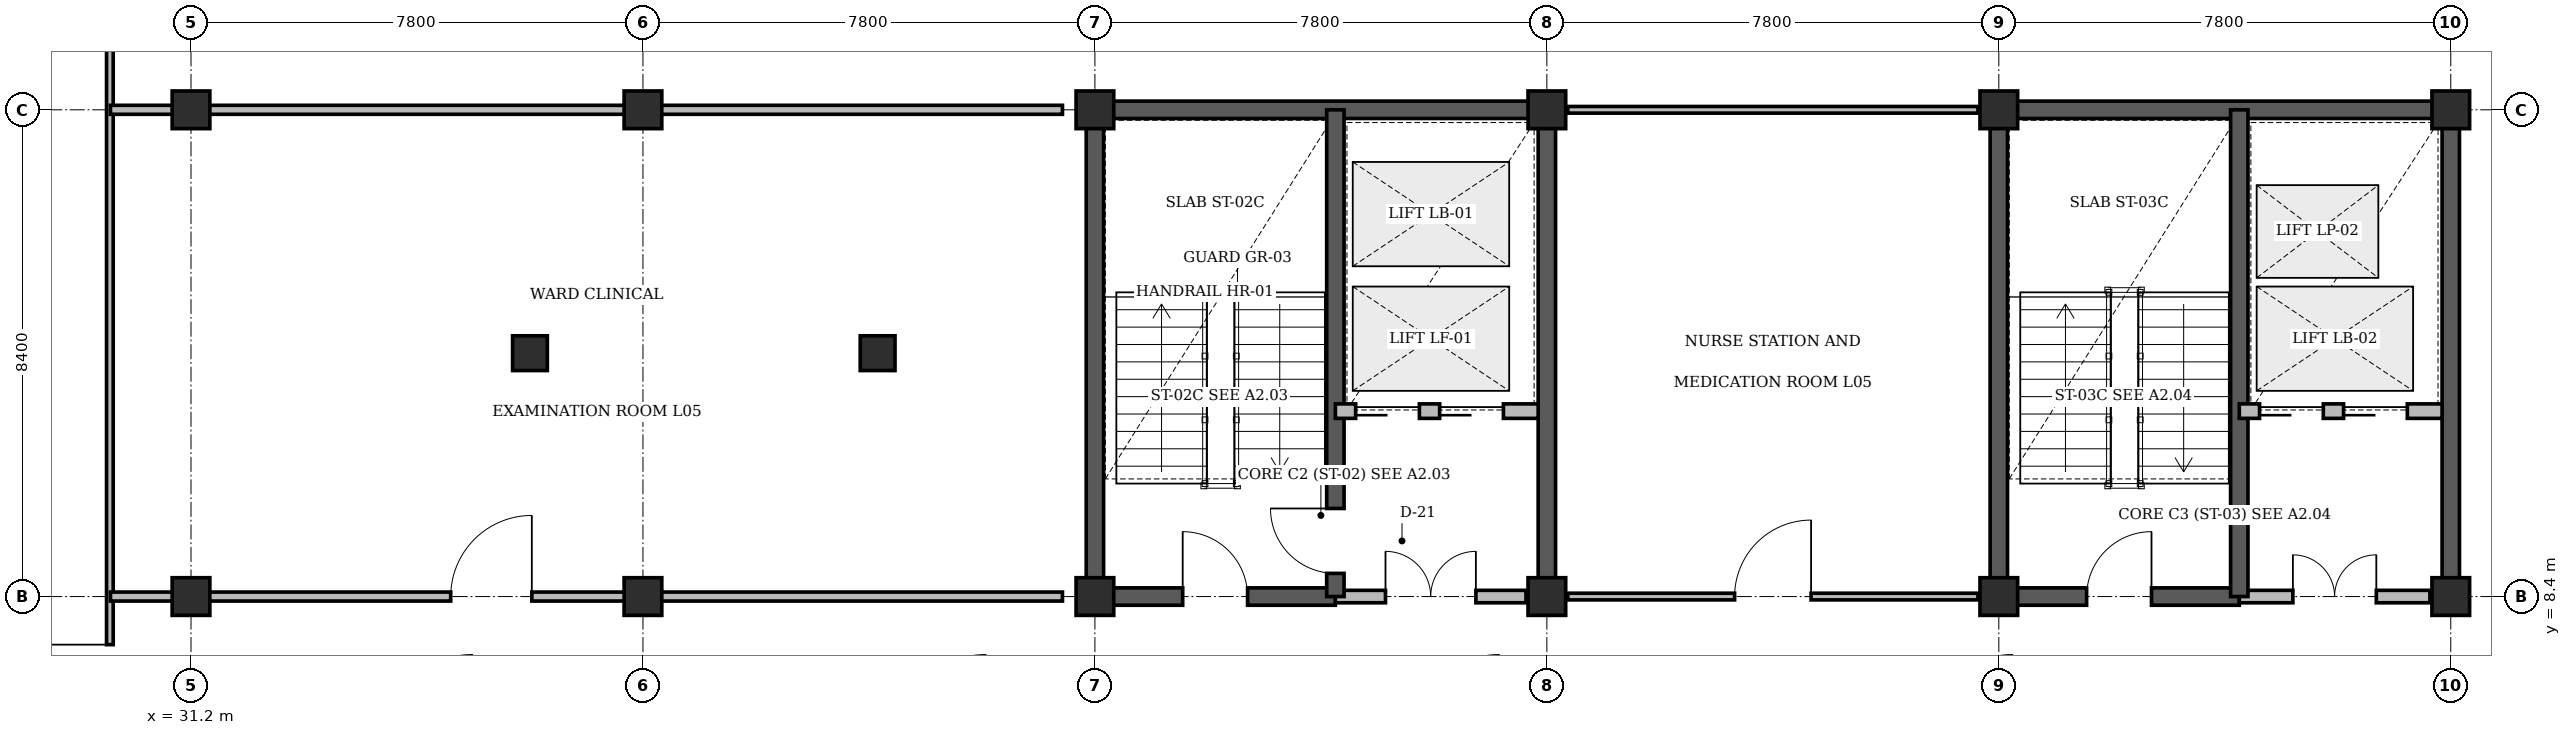
"""IFC4 building model, lengths in metres.
Left out: names, types, materials, properties, quantities, classifications, styles, units other than length and angle.
Written with IfcOpenShell. Run it as: python <this file> out.ifc"""

import sys

from ifc_helpers import new_model, si_unit, direction, frame, frame_2d, origin, origin_2d, place, context, subcontext, project, spatial, rectangle, circle, extrude, element, fill, save


model = new_model("IFC4")
c1 = context("Model", 3, precision=1e-05, world=origin(), true_north=direction((0.0, 1.0)))
c2 = subcontext(c1, "Body", "Model", "MODEL_VIEW")
j1 = project(units=[si_unit("LENGTHUNIT", "METRE"), si_unit("PLANEANGLEUNIT", "RADIAN")], contexts=[c1])
p1 = place(None, origin())
s1 = spatial("IfcSite", under=j1, at=p1, CompositionType="ELEMENT")
p2 = place(p1, origin())
s2 = spatial("IfcBuilding", under=s1, at=p2, CompositionType="ELEMENT")
p3 = place(p2, frame((0.0, 0.0, 22.2)))
s3 = spatial("IfcBuildingStorey", under=s2, at=p3, CompositionType="ELEMENT", Elevation=22.2)
p4 = place(p3, frame((46.65, 16.8, 0.0), z_axis=(0.0, 0.0, 1.0), x_axis=(1.0, 0.0, 0.0)))
e1 = element("IfcWall", 1, at=p4, inside=s3, PredefinedType="SHEAR", context=c2, shape_type="SweptSolid", body=[
    extrude(rectangle(XDim=8.1, YDim=0.3, at=frame_2d((4.05, 0.0))), origin(), (0.0, 0.0, 1.0), 3.92),
])
for number, where, z_axis, x_axis in (
    (2, (46.8, 8.4, 0.0), (0.0, 0.0, 1.0), (0.0, 1.0, 0.0)),
    (3, (54.6, 8.4, 0.0), (0.0, 0.0, 1.0), (0.0, 1.0, 0.0)),
):
    element("IfcWall", number, at=place(p3, frame(where, z_axis=z_axis, x_axis=x_axis)), inside=s3, PredefinedType="SHEAR", context=c2, shape_type="SweptSolid", body=[
        extrude(rectangle(XDim=8.4, YDim=0.3, at=frame_2d((4.2, 0.0))), origin(), (0.0, 0.0, 1.0), 3.92),
    ])
p5 = place(p3, frame((62.25, 16.8, 0.0), z_axis=(0.0, 0.0, 1.0), x_axis=(1.0, 0.0, 0.0)))
e4 = element("IfcWall", 4, at=p5, inside=s3, PredefinedType="SHEAR", context=c2, shape_type="SweptSolid", body=[
    extrude(rectangle(XDim=8.1, YDim=0.3, at=frame_2d((4.05, 0.0))), origin(), (0.0, 0.0, 1.0), 3.92),
])
for number, where, z_axis, x_axis in (
    (5, (62.4, 8.4, 0.0), (0.0, 0.0, 1.0), (0.0, 1.0, 0.0)),
    (6, (70.2, 8.4, 0.0), (0.0, 0.0, 1.0), (0.0, 1.0, 0.0)),
):
    element("IfcWall", number, at=place(p3, frame(where, z_axis=z_axis, x_axis=x_axis)), inside=s3, PredefinedType="SHEAR", context=c2, shape_type="SweptSolid", body=[
        extrude(rectangle(XDim=8.4, YDim=0.3, at=frame_2d((4.2, 0.0))), origin(), (0.0, 0.0, 1.0), 3.92),
    ])
for number, where, z_axis, x_axis in (
    (7, (31.2, 8.4, 0.0), (0.0, 0.0, 1.0), (1.0, 0.0, 0.0)),
    (8, (31.2, 16.8, 0.0), (0.0, 0.0, 1.0), (1.0, 0.0, 0.0)),
    (9, (39.0, 8.4, 0.0), (0.0, 0.0, 1.0), (1.0, 0.0, 0.0)),
    (10, (39.0, 16.8, 0.0), (0.0, 0.0, 1.0), (1.0, 0.0, 0.0)),
    (11, (46.8, 8.4, 0.0), (0.0, 0.0, 1.0), (1.0, 0.0, 0.0)),
    (12, (46.8, 16.8, 0.0), (0.0, 0.0, 1.0), (1.0, 0.0, 0.0)),
    (13, (54.6, 8.4, 0.0), (0.0, 0.0, 1.0), (1.0, 0.0, 0.0)),
    (14, (54.6, 16.8, 0.0), (0.0, 0.0, 1.0), (1.0, 0.0, 0.0)),
    (15, (62.4, 8.4, 0.0), (0.0, 0.0, 1.0), (1.0, 0.0, 0.0)),
    (16, (62.4, 16.8, 0.0), (0.0, 0.0, 1.0), (1.0, 0.0, 0.0)),
    (17, (70.2, 8.4, 0.0), (0.0, 0.0, 1.0), (1.0, 0.0, 0.0)),
    (18, (70.2, 16.8, 0.0), (0.0, 0.0, 1.0), (1.0, 0.0, 0.0)),
):
    element("IfcColumn", number, at=place(p3, frame(where, z_axis=z_axis, x_axis=x_axis)), inside=s3, PredefinedType="COLUMN", context=c2, shape_type="SweptSolid", body=[
        extrude(rectangle(XDim=0.65, YDim=0.65, at=origin_2d()), origin(), (0.0, 0.0, 1.0), 4.2),
    ])
for number, where, z_axis, x_axis in (
    (19, (37.05, 12.6, 0.0), (0.0, 0.0, 1.0), (1.0, 0.0, 0.0)),
    (20, (43.05, 12.6, 0.0), (0.0, 0.0, 1.0), (1.0, 0.0, 0.0)),
):
    element("IfcColumn", number, at=place(p3, frame(where, z_axis=z_axis, x_axis=x_axis)), inside=s3, PredefinedType="PILASTER", context=c2, shape_type="SweptSolid", body=[
        extrude(circle(Radius=0.3, at=origin_2d()), origin(), (0.0, 0.0, 1.0), 4.2),
    ])
p6 = place(p3, frame((46.8, 8.4, 0.0), z_axis=(0.0, 0.0, 1.0), x_axis=(1.0, 0.0, 0.0)))
e21 = element("IfcWall", 21, at=p6, inside=s3, PredefinedType="SHEAR", context=c2, shape_type="SweptSolid", body=[
    extrude(rectangle(XDim=4.15, YDim=0.3, at=frame_2d((2.075, 0.0))), origin(), (0.0, 0.0, 1.0), 4.2),
])
p7 = place(p6, frame((1.515, 0.0, 0.0)))
e22 = element("IfcOpeningElement", 22, at=p7, cuts=e21, PredefinedType="OPENING", context=c2, shape_type="SweptSolid", body=[
    extrude(rectangle(XDim=1.12, YDim=2.15, at=frame_2d((0.56, 1.075))), frame((0.0, 0.16, 0.0), z_axis=(0.0, -1.0, 0.0), x_axis=(1.0, 0.0, 0.0)), (0.0, 0.0, 1.0), 0.32),
])
p8 = place(p3, frame((50.95, 8.4, 0.0), z_axis=(0.0, 0.0, 1.0), x_axis=(1.0, 0.0, 0.0)))
e23 = element("IfcWall", 23, at=p8, inside=s3, PredefinedType="STANDARD", context=c2, shape_type="SweptSolid", body=[
    extrude(rectangle(XDim=3.29, YDim=0.215, at=frame_2d((1.645, 0.0))), origin(), (0.0, 0.0, 1.0), 3.27),
])
p9 = place(p8, frame((0.865, 0.0, 0.0)))
e24 = element("IfcOpeningElement", 24, at=p9, cuts=e23, PredefinedType="OPENING", context=c2, shape_type="SweptSolid", body=[
    extrude(rectangle(XDim=1.56, YDim=2.2, at=frame_2d((0.78, 1.1))), frame((0.0, 0.118, 0.0), z_axis=(0.0, -1.0, 0.0), x_axis=(1.0, 0.0, 0.0)), (0.0, 0.0, 1.0), 0.235),
])
p10 = place(p3, frame((50.95, 8.4, 0.0), z_axis=(0.0, 0.0, 1.0), x_axis=(0.0, 1.0, 0.0)))
e25 = element("IfcWall", 25, at=p10, inside=s3, PredefinedType="SHEAR", context=c2, shape_type="SweptSolid", body=[
    extrude(rectangle(XDim=8.4, YDim=0.3, at=frame_2d((4.2, 0.0))), origin(), (0.0, 0.0, 1.0), 4.2),
])
p11 = place(p10, frame((0.4, 0.0, 0.0)))
e26 = element("IfcOpeningElement", 26, at=p11, cuts=e25, PredefinedType="OPENING", context=c2, shape_type="SweptSolid", body=[
    extrude(rectangle(XDim=1.12, YDim=2.15, at=frame_2d((0.56, 1.075))), frame((0.0, 0.16, 0.0), z_axis=(0.0, -1.0, 0.0), x_axis=(1.0, 0.0, 0.0)), (0.0, 0.0, 1.0), 0.32),
])
p12 = place(p3, frame((50.95, 11.6, 0.0), z_axis=(0.0, 0.0, 1.0), x_axis=(1.0, 0.0, 0.0)))
e27 = element("IfcWall", 27, at=p12, inside=s3, PredefinedType="STANDARD", context=c2, shape_type="SweptSolid", body=[
    extrude(rectangle(XDim=3.5, YDim=0.25, at=frame_2d((1.75, 0.0))), origin(), (0.0, 0.0, 1.0), 3.9),
])
p13 = place(p12, frame((0.35, 0.0, 0.0)))
e28 = element("IfcOpeningElement", 28, at=p13, cuts=e27, PredefinedType="OPENING", context=c2, shape_type="SweptSolid", body=[
    extrude(rectangle(XDim=1.1, YDim=2.2, at=frame_2d((0.55, 1.1))), frame((0.0, 0.135, 0.0), z_axis=(0.0, -1.0, 0.0), x_axis=(1.0, 0.0, 0.0)), (0.0, 0.0, 1.0), 0.27),
])
p14 = place(p12, frame((1.8, 0.0, 0.0)))
e29 = element("IfcOpeningElement", 29, at=p14, cuts=e27, PredefinedType="OPENING", context=c2, shape_type="SweptSolid", body=[
    extrude(rectangle(XDim=1.1, YDim=2.2, at=frame_2d((0.55, 1.1))), frame((0.0, 0.135, 0.0), z_axis=(0.0, -1.0, 0.0), x_axis=(1.0, 0.0, 0.0)), (0.0, 0.0, 1.0), 0.27),
])
p15 = place(p3, frame((62.4, 8.4, 0.0), z_axis=(0.0, 0.0, 1.0), x_axis=(1.0, 0.0, 0.0)))
e30 = element("IfcWall", 30, at=p15, inside=s3, PredefinedType="SHEAR", context=c2, shape_type="SweptSolid", body=[
    extrude(rectangle(XDim=4.15, YDim=0.3, at=frame_2d((2.075, 0.0))), origin(), (0.0, 0.0, 1.0), 4.2),
])
p16 = place(p15, frame((1.515, 0.0, 0.0)))
e31 = element("IfcOpeningElement", 31, at=p16, cuts=e30, PredefinedType="OPENING", context=c2, shape_type="SweptSolid", body=[
    extrude(rectangle(XDim=1.12, YDim=2.15, at=frame_2d((0.56, 1.075))), frame((0.0, 0.16, 0.0), z_axis=(0.0, -1.0, 0.0), x_axis=(1.0, 0.0, 0.0)), (0.0, 0.0, 1.0), 0.32),
])
p17 = place(p3, frame((66.55, 8.4, 0.0), z_axis=(0.0, 0.0, 1.0), x_axis=(1.0, 0.0, 0.0)))
e32 = element("IfcWall", 32, at=p17, inside=s3, PredefinedType="STANDARD", context=c2, shape_type="SweptSolid", body=[
    extrude(rectangle(XDim=3.29, YDim=0.215, at=frame_2d((1.645, 0.0))), origin(), (0.0, 0.0, 1.0), 3.27),
])
p18 = place(p17, frame((0.925, 0.0, 0.0)))
e33 = element("IfcOpeningElement", 33, at=p18, cuts=e32, PredefinedType="OPENING", context=c2, shape_type="SweptSolid", body=[
    extrude(rectangle(XDim=1.44, YDim=2.2, at=frame_2d((0.72, 1.1))), frame((0.0, 0.118, 0.0), z_axis=(0.0, -1.0, 0.0), x_axis=(1.0, 0.0, 0.0)), (0.0, 0.0, 1.0), 0.235),
])
p19 = place(p3, frame((66.55, 8.4, 0.0), z_axis=(0.0, 0.0, 1.0), x_axis=(0.0, 1.0, 0.0)))
e34 = element("IfcWall", 34, at=p19, inside=s3, PredefinedType="SHEAR", context=c2, shape_type="SweptSolid", body=[
    extrude(rectangle(XDim=8.4, YDim=0.3, at=frame_2d((4.2, 0.0))), origin(), (0.0, 0.0, 1.0), 4.2),
])
p20 = place(p3, frame((66.55, 11.6, 0.0), z_axis=(0.0, 0.0, 1.0), x_axis=(1.0, 0.0, 0.0)))
e35 = element("IfcWall", 35, at=p20, inside=s3, PredefinedType="STANDARD", context=c2, shape_type="SweptSolid", body=[
    extrude(rectangle(XDim=3.5, YDim=0.25, at=frame_2d((1.75, 0.0))), origin(), (0.0, 0.0, 1.0), 3.9),
])
p21 = place(p20, frame((0.35, 0.0, 0.0)))
e36 = element("IfcOpeningElement", 36, at=p21, cuts=e35, PredefinedType="OPENING", context=c2, shape_type="SweptSolid", body=[
    extrude(rectangle(XDim=1.1, YDim=2.2, at=frame_2d((0.55, 1.1))), frame((0.0, 0.135, 0.0), z_axis=(0.0, -1.0, 0.0), x_axis=(1.0, 0.0, 0.0)), (0.0, 0.0, 1.0), 0.27),
])
p22 = place(p20, frame((1.8, 0.0, 0.0)))
e37 = element("IfcOpeningElement", 37, at=p22, cuts=e35, PredefinedType="OPENING", context=c2, shape_type="SweptSolid", body=[
    extrude(rectangle(XDim=1.1, YDim=2.2, at=frame_2d((0.55, 1.1))), frame((0.0, 0.135, 0.0), z_axis=(0.0, -1.0, 0.0), x_axis=(1.0, 0.0, 0.0)), (0.0, 0.0, 1.0), 0.27),
])
p23 = place(p3, frame((29.8, 6.0, 0.0), z_axis=(0.0, 0.0, 1.0), x_axis=(0.0, 1.0, 0.0)))
e38 = element("IfcWall", 38, at=p23, inside=s3, PredefinedType="PARTITIONING", context=c2, shape_type="SweptSolid", body=[
    extrude(rectangle(XDim=13.2, YDim=0.115, at=frame_2d((6.6, 0.0))), origin(), (0.0, 0.0, 1.0), 3.9),
])
p24 = place(p23, frame((0.25, 0.0, 0.0)))
e39 = element("IfcOpeningElement", 39, at=p24, cuts=e38, PredefinedType="OPENING", context=c2, shape_type="SweptSolid", body=[
    extrude(rectangle(XDim=1.32, YDim=2.15, at=frame_2d((0.66, 1.075))), frame((0.0, 0.067, 0.0), z_axis=(0.0, -1.0, 0.0), x_axis=(1.0, 0.0, 0.0)), (0.0, 0.0, 1.0), 0.135),
])
p25 = place(p3, frame((54.96, 8.4, 0.0), z_axis=(0.0, 0.0, 1.0), x_axis=(1.0, 0.0, 0.0)))
e40 = element("IfcWall", 40, at=p25, inside=s3, PredefinedType="PARTITIONING", context=c2, shape_type="SweptSolid", body=[
    extrude(rectangle(XDim=7.08, YDim=0.115, at=frame_2d((3.54, 0.0))), origin(), (0.0, 0.0, 1.0), 3.27),
])
p26 = place(p25, frame((2.88, 0.0, 0.0)))
e41 = element("IfcOpeningElement", 41, at=p26, cuts=e40, PredefinedType="OPENING", context=c2, shape_type="SweptSolid", body=[
    extrude(rectangle(XDim=1.32, YDim=2.15, at=frame_2d((0.66, 1.075))), frame((0.0, 0.067, 0.0), z_axis=(0.0, -1.0, 0.0), x_axis=(1.0, 0.0, 0.0)), (0.0, 0.0, 1.0), 0.135),
])
p27 = place(p3, frame((54.96, 16.8, 0.0), z_axis=(0.0, 0.0, 1.0), x_axis=(1.0, 0.0, 0.0)))
e42 = element("IfcWall", 42, at=p27, inside=s3, PredefinedType="PARTITIONING", context=c2, shape_type="SweptSolid", body=[
    extrude(rectangle(XDim=7.08, YDim=0.115, at=frame_2d((3.54, 0.0))), origin(), (0.0, 0.0, 1.0), 3.27),
])
p28 = place(p3, frame((29.81, 8.4, 0.0), z_axis=(0.0, 0.0, 1.0), x_axis=(1.0, 0.0, 0.0)))
e43 = element("IfcWall", 43, at=p28, inside=s3, PredefinedType="PARTITIONING", context=c2, shape_type="SweptSolid", body=[
    extrude(rectangle(XDim=16.43, YDim=0.155, at=frame_2d((8.215, 0.0))), origin(), (0.0, 0.0, 1.0), 3.27),
])
p29 = place(p28, frame((5.872, 0.0, 0.0)))
e44 = element("IfcOpeningElement", 44, at=p29, cuts=e43, PredefinedType="OPENING", context=c2, shape_type="SweptSolid", body=[
    extrude(rectangle(XDim=1.4, YDim=2.2, at=frame_2d((0.7, 1.1))), frame((0.0, 0.087, 0.0), z_axis=(0.0, -1.0, 0.0), x_axis=(1.0, 0.0, 0.0)), (0.0, 0.0, 1.0), 0.175),
])
p30 = place(p3, frame((29.81, 16.8, 0.0), z_axis=(0.0, 0.0, 1.0), x_axis=(1.0, 0.0, 0.0)))
e45 = element("IfcWall", 45, at=p30, inside=s3, PredefinedType="PARTITIONING", context=c2, shape_type="SweptSolid", body=[
    extrude(rectangle(XDim=16.43, YDim=0.155, at=frame_2d((8.215, 0.0))), origin(), (0.0, 0.0, 1.0), 3.27),
])
p31 = place(p7, origin())
e46 = element("IfcDoor", 46, at=p31, inside=s3, OperationType="SINGLE_SWING_LEFT", PredefinedType="DOOR", context=c2, shape_type="SweptSolid", body=[
    extrude(rectangle(XDim=1.12, YDim=2.15, at=frame_2d((0.56, 1.075))), frame((0.0, 0.025, 0.0), z_axis=(0.0, -1.0, 0.0), x_axis=(1.0, 0.0, 0.0)), (0.0, 0.0, 1.0), 0.05),
])
fill(e22, e46)
p32 = place(p9, origin())
e47 = element("IfcDoor", 47, at=p32, inside=s3, OperationType="DOUBLE_DOOR_SINGLE_SWING", PredefinedType="DOOR", context=c2, shape_type="SweptSolid", body=[
    extrude(rectangle(XDim=1.56, YDim=2.2, at=frame_2d((0.78, 1.1))), frame((0.0, 0.025, 0.0), z_axis=(0.0, -1.0, 0.0), x_axis=(1.0, 0.0, 0.0)), (0.0, 0.0, 1.0), 0.05),
])
fill(e24, e47)
p33 = place(p11, origin())
e48 = element("IfcDoor", 48, at=p33, inside=s3, OperationType="SINGLE_SWING_RIGHT", PredefinedType="DOOR", context=c2, shape_type="SweptSolid", body=[
    extrude(rectangle(XDim=1.12, YDim=2.15, at=frame_2d((0.56, 1.075))), frame((0.0, 0.025, 0.0), z_axis=(0.0, -1.0, 0.0), x_axis=(1.0, 0.0, 0.0)), (0.0, 0.0, 1.0), 0.05),
])
fill(e26, e48)
p34 = place(p13, origin())
e49 = element("IfcDoor", 49, at=p34, inside=s3, OperationType="SLIDING_TO_LEFT", PredefinedType="DOOR", context=c2, shape_type="SweptSolid", body=[
    extrude(rectangle(XDim=1.1, YDim=2.2, at=frame_2d((0.55, 1.1))), frame((0.0, 0.025, 0.0), z_axis=(0.0, -1.0, 0.0), x_axis=(1.0, 0.0, 0.0)), (0.0, 0.0, 1.0), 0.05),
])
fill(e28, e49)
p35 = place(p14, origin())
e50 = element("IfcDoor", 50, at=p35, inside=s3, OperationType="SLIDING_TO_LEFT", PredefinedType="DOOR", context=c2, shape_type="SweptSolid", body=[
    extrude(rectangle(XDim=1.1, YDim=2.2, at=frame_2d((0.55, 1.1))), frame((0.0, 0.025, 0.0), z_axis=(0.0, -1.0, 0.0), x_axis=(1.0, 0.0, 0.0)), (0.0, 0.0, 1.0), 0.05),
])
fill(e29, e50)
p36 = place(p16, origin())
e51 = element("IfcDoor", 51, at=p36, inside=s3, OperationType="SINGLE_SWING_RIGHT", PredefinedType="DOOR", context=c2, shape_type="SweptSolid", body=[
    extrude(rectangle(XDim=1.12, YDim=2.15, at=frame_2d((0.56, 1.075))), frame((0.0, 0.025, 0.0), z_axis=(0.0, -1.0, 0.0), x_axis=(1.0, 0.0, 0.0)), (0.0, 0.0, 1.0), 0.05),
])
fill(e31, e51)
p37 = place(p18, origin())
e52 = element("IfcDoor", 52, at=p37, inside=s3, OperationType="DOUBLE_DOOR_SINGLE_SWING", PredefinedType="DOOR", context=c2, shape_type="SweptSolid", body=[
    extrude(rectangle(XDim=1.44, YDim=2.2, at=frame_2d((0.72, 1.1))), frame((0.0, 0.025, 0.0), z_axis=(0.0, -1.0, 0.0), x_axis=(1.0, 0.0, 0.0)), (0.0, 0.0, 1.0), 0.05),
])
fill(e33, e52)
p38 = place(p21, origin())
e53 = element("IfcDoor", 53, at=p38, inside=s3, OperationType="SLIDING_TO_LEFT", PredefinedType="DOOR", context=c2, shape_type="SweptSolid", body=[
    extrude(rectangle(XDim=1.1, YDim=2.2, at=frame_2d((0.55, 1.1))), frame((0.0, 0.025, 0.0), z_axis=(0.0, -1.0, 0.0), x_axis=(1.0, 0.0, 0.0)), (0.0, 0.0, 1.0), 0.05),
])
fill(e36, e53)
p39 = place(p22, origin())
e54 = element("IfcDoor", 54, at=p39, inside=s3, OperationType="SLIDING_TO_LEFT", PredefinedType="DOOR", context=c2, shape_type="SweptSolid", body=[
    extrude(rectangle(XDim=1.1, YDim=2.2, at=frame_2d((0.55, 1.1))), frame((0.0, 0.025, 0.0), z_axis=(0.0, -1.0, 0.0), x_axis=(1.0, 0.0, 0.0)), (0.0, 0.0, 1.0), 0.05),
])
fill(e37, e54)
p40 = place(p24, origin())
e55 = element("IfcDoor", 55, at=p40, inside=s3, OperationType="SINGLE_SWING_RIGHT", PredefinedType="DOOR", context=c2, shape_type="SweptSolid", body=[
    extrude(rectangle(XDim=1.32, YDim=2.15, at=frame_2d((0.66, 1.075))), frame((0.0, 0.025, 0.0), z_axis=(0.0, -1.0, 0.0), x_axis=(1.0, 0.0, 0.0)), (0.0, 0.0, 1.0), 0.05),
])
fill(e39, e55)
p41 = place(p26, origin())
e56 = element("IfcDoor", 56, at=p41, inside=s3, OperationType="SINGLE_SWING_RIGHT", PredefinedType="DOOR", context=c2, shape_type="SweptSolid", body=[
    extrude(rectangle(XDim=1.32, YDim=2.15, at=frame_2d((0.66, 1.075))), frame((0.0, 0.025, 0.0), z_axis=(0.0, -1.0, 0.0), x_axis=(1.0, 0.0, 0.0)), (0.0, 0.0, 1.0), 0.05),
])
fill(e41, e56)
p42 = place(p29, origin())
e57 = element("IfcDoor", 57, at=p42, inside=s3, OperationType="SINGLE_SWING_RIGHT", PredefinedType="DOOR", context=c2, shape_type="SweptSolid", body=[
    extrude(rectangle(XDim=1.4, YDim=2.2, at=frame_2d((0.7, 1.1))), frame((0.0, 0.025, 0.0), z_axis=(0.0, -1.0, 0.0), x_axis=(1.0, 0.0, 0.0)), (0.0, 0.0, 1.0), 0.05),
])
fill(e44, e57)
save(model, sys.argv[1])
